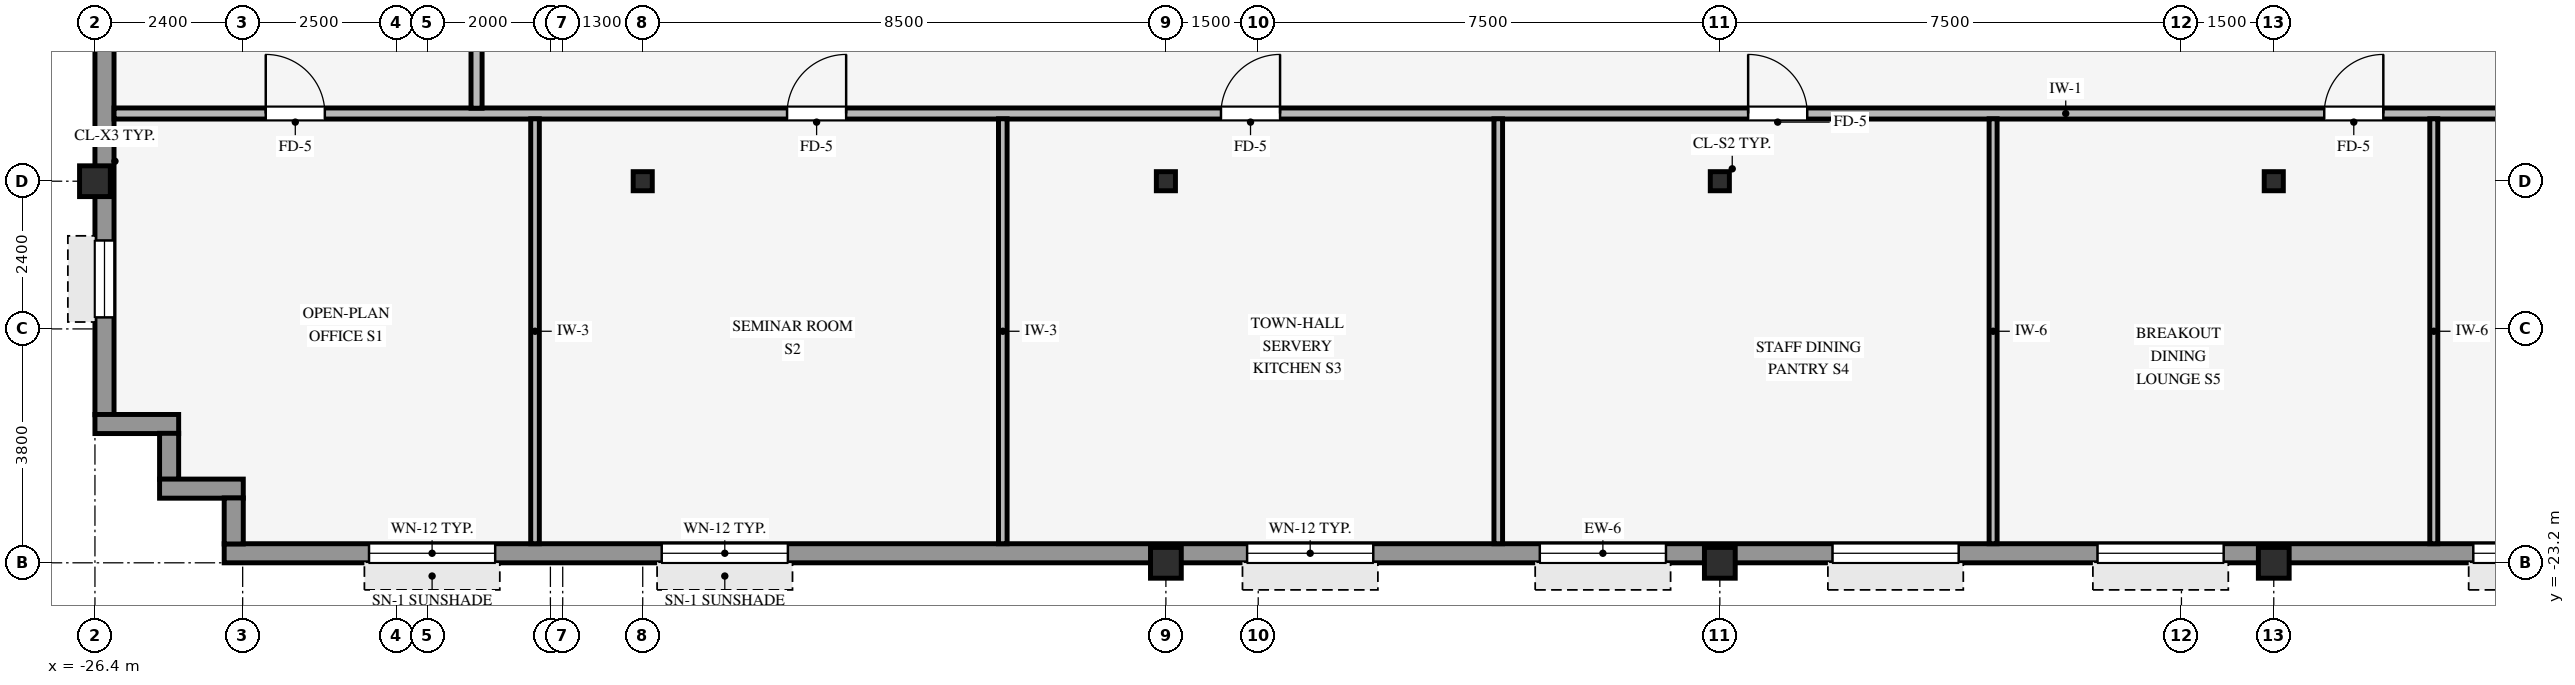
"""IFC4 building model, lengths in metres.
Left out: names, types, materials, properties, quantities, classifications, styles, units other than length and angle.
Written with IfcOpenShell. Run it as: python <this file> out.ifc"""

import sys

from ifc_helpers import new_model, si_unit, direction, frame, frame_2d, origin, origin_2d, place, context, subcontext, project, spatial, rectangle, hollow_rectangle, i_section, extrude, source, transform, mapped, element, fill, save


model = new_model("IFC4")
c1 = context("Model", 3, precision=1e-05, world=origin(), true_north=direction((0.0, 1.0)))
c2 = subcontext(c1, "Body", "Model", "MODEL_VIEW")
j1 = project(units=[si_unit("LENGTHUNIT", "METRE"), si_unit("PLANEANGLEUNIT", "RADIAN")], contexts=[c1])
p1 = place(None, origin())
s1 = spatial("IfcSite", under=j1, at=p1, CompositionType="ELEMENT")
p2 = place(p1, origin())
s2 = spatial("IfcBuilding", under=s1, at=p2, CompositionType="ELEMENT")
p3 = place(p2, frame((0.0, 0.0, 194.55)))
s3 = spatial("IfcBuildingStorey", under=s2, at=p3, CompositionType="ELEMENT", Elevation=194.55)
for number, where, z_axis, x_axis in (
    (1, (-26.4, -17.0, 0.0), (0.0, 0.0, 1.0), (1.0, 0.0, 0.0)),
    (2, (-9.0, -23.2, 0.0), (0.0, 0.0, 1.0), (1.0, 0.0, 0.0)),
    (3, (0.0, -23.2, 0.0), (0.0, 0.0, 1.0), (1.0, 0.0, 0.0)),
    (4, (9.0, -23.2, 0.0), (0.0, 0.0, 1.0), (1.0, 0.0, 0.0)),
):
    element("IfcColumn", number, at=place(p3, frame(where, z_axis=z_axis, x_axis=x_axis)), inside=s3, PredefinedType="COLUMN", context=c2, shape_type="SweptSolid", body=[
        extrude(hollow_rectangle(XDim=0.5, YDim=0.5, WallThickness=0.032, InnerFilletRadius=0.032, OuterFilletRadius=0.064, at=origin_2d()), origin(), (0.0, 0.0, 1.0), 3.37),
    ])
for number, where, z_axis, x_axis in (
    (5, (0.0, -17.0, 0.0), (0.0, 0.0, 1.0), (1.0, 0.0, 0.0)),
    (6, (-17.5, -17.0, 0.0), (0.0, 0.0, 1.0), (1.0, 0.0, 0.0)),
    (7, (-9.0, -17.0, 0.0), (0.0, 0.0, 1.0), (1.0, 0.0, 0.0)),
    (8, (9.0, -17.0, 0.0), (0.0, 0.0, 1.0), (1.0, 0.0, 0.0)),
):
    element("IfcColumn", number, at=place(p3, frame(where, z_axis=z_axis, x_axis=x_axis)), inside=s3, PredefinedType="COLUMN", context=c2, shape_type="SweptSolid", body=[
        extrude(i_section(OverallWidth=0.31, OverallDepth=0.31, WebThickness=0.015, FlangeThickness=0.015, FilletRadius=0.015, at=origin_2d()), origin(), (0.0, 0.0, 1.0), 3.37),
    ])
p4 = place(p3, frame((-24.3, -23.045, 0.0), z_axis=(0.0, 0.0, 1.0), x_axis=(1.0, 0.0, 0.0)))
e9 = element("IfcWall", 9, at=p4, inside=s3, PredefinedType="STANDARD", context=c2, shape_type="SweptSolid", body=[
    extrude(rectangle(XDim=44.8, YDim=0.31, at=frame_2d((22.4, 0.0))), origin(), (0.0, 0.0, 1.0), 2.705),
])
p5 = place(p4, frame((2.353, 0.0, 0.8)))
e10 = element("IfcOpeningElement", 10, at=p5, cuts=e9, PredefinedType="OPENING", context=c2, shape_type="SweptSolid", body=[
    extrude(rectangle(XDim=2.05, YDim=1.52, at=frame_2d((1.025, 0.76))), frame((0.0, 0.165, 0.0), z_axis=(0.0, -1.0, 0.0), x_axis=(1.0, 0.0, 0.0)), (0.0, 0.0, 1.0), 0.33),
])
p6 = place(p4, frame((7.108, 0.0, 0.8)))
e11 = element("IfcOpeningElement", 11, at=p6, cuts=e9, PredefinedType="OPENING", context=c2, shape_type="SweptSolid", body=[
    extrude(rectangle(XDim=2.05, YDim=1.52, at=frame_2d((1.025, 0.76))), frame((0.0, 0.165, 0.0), z_axis=(0.0, -1.0, 0.0), x_axis=(1.0, 0.0, 0.0)), (0.0, 0.0, 1.0), 0.33),
])
p7 = place(p4, frame((16.619, 0.0, 0.8)))
e12 = element("IfcOpeningElement", 12, at=p7, cuts=e9, PredefinedType="OPENING", context=c2, shape_type="SweptSolid", body=[
    extrude(rectangle(XDim=2.05, YDim=1.52, at=frame_2d((1.025, 0.76))), frame((0.0, 0.165, 0.0), z_axis=(0.0, -1.0, 0.0), x_axis=(1.0, 0.0, 0.0)), (0.0, 0.0, 1.0), 0.33),
])
p8 = place(p4, frame((21.375, 0.0, 0.8)))
e13 = element("IfcOpeningElement", 13, at=p8, cuts=e9, PredefinedType="OPENING", context=c2, shape_type="SweptSolid", body=[
    extrude(rectangle(XDim=2.05, YDim=1.52, at=frame_2d((1.025, 0.76))), frame((0.0, 0.165, 0.0), z_axis=(0.0, -1.0, 0.0), x_axis=(1.0, 0.0, 0.0)), (0.0, 0.0, 1.0), 0.33),
])
p9 = place(p4, frame((26.131, 0.0, 0.8)))
e14 = element("IfcOpeningElement", 14, at=p9, cuts=e9, PredefinedType="OPENING", context=c2, shape_type="SweptSolid", body=[
    extrude(rectangle(XDim=2.05, YDim=1.52, at=frame_2d((1.025, 0.76))), frame((0.0, 0.165, 0.0), z_axis=(0.0, -1.0, 0.0), x_axis=(1.0, 0.0, 0.0)), (0.0, 0.0, 1.0), 0.33),
])
p10 = place(p4, frame((30.436, 0.0, 0.8)))
e15 = element("IfcOpeningElement", 15, at=p10, cuts=e9, PredefinedType="OPENING", context=c2, shape_type="SweptSolid", body=[
    extrude(rectangle(XDim=2.05, YDim=1.52, at=frame_2d((1.025, 0.76))), frame((0.0, 0.165, 0.0), z_axis=(0.0, -1.0, 0.0), x_axis=(1.0, 0.0, 0.0)), (0.0, 0.0, 1.0), 0.33),
])
p11 = place(p4, frame((36.542, 0.0, 0.8)))
e16 = element("IfcOpeningElement", 16, at=p11, cuts=e9, PredefinedType="OPENING", context=c2, shape_type="SweptSolid", body=[
    extrude(rectangle(XDim=2.05, YDim=1.52, at=frame_2d((1.025, 0.76))), frame((0.0, 0.165, 0.0), z_axis=(0.0, -1.0, 0.0), x_axis=(1.0, 0.0, 0.0)), (0.0, 0.0, 1.0), 0.33),
])
p12 = place(p4, frame((40.397, 0.0, 0.8)))
e17 = element("IfcOpeningElement", 17, at=p12, cuts=e9, PredefinedType="OPENING", context=c2, shape_type="SweptSolid", body=[
    extrude(rectangle(XDim=2.05, YDim=1.52, at=frame_2d((1.025, 0.76))), frame((0.0, 0.165, 0.0), z_axis=(0.0, -1.0, 0.0), x_axis=(1.0, 0.0, 0.0)), (0.0, 0.0, 1.0), 0.33),
])
p13 = place(p3, frame((-26.245, -20.794, 0.0), z_axis=(0.0, 0.0, 1.0), x_axis=(0.0, 1.0, 0.0)))
e18 = element("IfcWall", 18, at=p13, inside=s3, PredefinedType="STANDARD", context=c2, shape_type="SweptSolid", body=[
    extrude(rectangle(XDim=37.788, YDim=0.31, at=frame_2d((18.894, 0.0))), origin(), (0.0, 0.0, 1.0), 2.705),
])
p14 = place(p13, frame((24.744, 0.0, 0.0)))
e19 = element("IfcOpeningElement", 19, at=p14, cuts=e18, PredefinedType="OPENING", context=c2, shape_type="SweptSolid", body=[
    extrude(rectangle(XDim=1.05, YDim=2.1, at=frame_2d((0.525, 1.05))), frame((0.0, 0.165, 0.0), z_axis=(0.0, -1.0, 0.0), x_axis=(1.0, 0.0, 0.0)), (0.0, 0.0, 1.0), 0.33),
])
p15 = place(p13, frame((1.581, 0.0, 0.8)))
e20 = element("IfcOpeningElement", 20, at=p15, cuts=e18, PredefinedType="OPENING", context=c2, shape_type="SweptSolid", body=[
    extrude(rectangle(XDim=1.25, YDim=1.52, at=frame_2d((0.625, 0.76))), frame((0.0, 0.165, 0.0), z_axis=(0.0, -1.0, 0.0), x_axis=(1.0, 0.0, 0.0)), (0.0, 0.0, 1.0), 0.33),
])
p16 = place(p13, frame((8.044, 0.0, 0.8)))
e21 = element("IfcOpeningElement", 21, at=p16, cuts=e18, PredefinedType="OPENING", context=c2, shape_type="SweptSolid", body=[
    extrude(rectangle(XDim=1.25, YDim=1.52, at=frame_2d((0.625, 0.76))), frame((0.0, 0.165, 0.0), z_axis=(0.0, -1.0, 0.0), x_axis=(1.0, 0.0, 0.0)), (0.0, 0.0, 1.0), 0.33),
])
p17 = place(p13, frame((13.156, 0.0, 0.8)))
e22 = element("IfcOpeningElement", 22, at=p17, cuts=e18, PredefinedType="OPENING", context=c2, shape_type="SweptSolid", body=[
    extrude(rectangle(XDim=1.25, YDim=1.52, at=frame_2d((0.625, 0.76))), frame((0.0, 0.165, 0.0), z_axis=(0.0, -1.0, 0.0), x_axis=(1.0, 0.0, 0.0)), (0.0, 0.0, 1.0), 0.33),
])
p18 = place(p13, frame((18.269, 0.0, 0.8)))
e23 = element("IfcOpeningElement", 23, at=p18, cuts=e18, PredefinedType="OPENING", context=c2, shape_type="SweptSolid", body=[
    extrude(rectangle(XDim=1.25, YDim=1.52, at=frame_2d((0.625, 0.76))), frame((0.0, 0.165, 0.0), z_axis=(0.0, -1.0, 0.0), x_axis=(1.0, 0.0, 0.0)), (0.0, 0.0, 1.0), 0.33),
])
p19 = place(p13, frame((22.932, 0.0, 0.8)))
e24 = element("IfcOpeningElement", 24, at=p19, cuts=e18, PredefinedType="OPENING", context=c2, shape_type="SweptSolid", body=[
    extrude(rectangle(XDim=1.25, YDim=1.52, at=frame_2d((0.625, 0.76))), frame((0.0, 0.165, 0.0), z_axis=(0.0, -1.0, 0.0), x_axis=(1.0, 0.0, 0.0)), (0.0, 0.0, 1.0), 0.33),
])
p20 = place(p13, frame((28.044, 0.0, 0.8)))
e25 = element("IfcOpeningElement", 25, at=p20, cuts=e18, PredefinedType="OPENING", context=c2, shape_type="SweptSolid", body=[
    extrude(rectangle(XDim=1.25, YDim=1.52, at=frame_2d((0.625, 0.76))), frame((0.0, 0.165, 0.0), z_axis=(0.0, -1.0, 0.0), x_axis=(1.0, 0.0, 0.0)), (0.0, 0.0, 1.0), 0.33),
])
p21 = place(p13, frame((33.607, 0.0, 0.8)))
e26 = element("IfcOpeningElement", 26, at=p21, cuts=e18, PredefinedType="OPENING", context=c2, shape_type="SweptSolid", body=[
    extrude(rectangle(XDim=1.25, YDim=1.52, at=frame_2d((0.625, 0.76))), frame((0.0, 0.165, 0.0), z_axis=(0.0, -1.0, 0.0), x_axis=(1.0, 0.0, 0.0)), (0.0, 0.0, 1.0), 0.33),
])
p22 = place(p3, frame((-26.4, -20.945, 0.0), z_axis=(0.0, 0.0, 1.0), x_axis=(1.0, 0.0, 0.0)))
e27 = element("IfcWall", 27, at=p22, inside=s3, PredefinedType="STANDARD", context=c2, shape_type="SweptSolid", body=[
    extrude(rectangle(XDim=1.36, YDim=0.31, at=frame_2d((0.68, 0.0))), origin(), (0.0, 0.0, 1.0), 3.36),
])
p23 = place(p3, frame((-25.195, -21.844, 0.0), z_axis=(0.0, 0.0, 1.0), x_axis=(0.0, 1.0, 0.0)))
e28 = element("IfcWall", 28, at=p23, inside=s3, PredefinedType="STANDARD", context=c2, shape_type="SweptSolid", body=[
    extrude(rectangle(XDim=0.748, YDim=0.31, at=frame_2d((0.374, 0.0))), origin(), (0.0, 0.0, 1.0), 3.36),
])
p24 = place(p3, frame((-25.35, -21.995, 0.0), z_axis=(0.0, 0.0, 1.0), x_axis=(1.0, 0.0, 0.0)))
e29 = element("IfcWall", 29, at=p24, inside=s3, PredefinedType="STANDARD", context=c2, shape_type="SweptSolid", body=[
    extrude(rectangle(XDim=1.36, YDim=0.31, at=frame_2d((0.68, 0.0))), origin(), (0.0, 0.0, 1.0), 3.36),
])
p25 = place(p3, frame((-24.145, -22.894, 0.0), z_axis=(0.0, 0.0, 1.0), x_axis=(0.0, 1.0, 0.0)))
e30 = element("IfcWall", 30, at=p25, inside=s3, PredefinedType="STANDARD", context=c2, shape_type="SweptSolid", body=[
    extrude(rectangle(XDim=0.748, YDim=0.31, at=frame_2d((0.374, 0.0))), origin(), (0.0, 0.0, 1.0), 3.36),
])
p26 = place(p3, frame((-26.09, -15.9, 0.0), z_axis=(0.0, 0.0, 1.0), x_axis=(1.0, 0.0, 0.0)))
e31 = element("IfcWall", 31, at=p26, inside=s3, PredefinedType="PARTITIONING", context=c2, shape_type="SweptSolid", body=[
    extrude(rectangle(XDim=48.38, YDim=0.18, at=frame_2d((24.19, 0.0))), origin(), (0.0, 0.0, 1.0), 3.36),
])
p27 = place(p26, frame((41.81, 0.0, 0.0)))
e32 = element("IfcOpeningElement", 32, at=p27, cuts=e31, PredefinedType="OPENING", context=c2, shape_type="SweptSolid", body=[
    extrude(rectangle(XDim=0.96, YDim=2.1, at=frame_2d((0.48, 1.05))), frame((0.0, 0.1, 0.0), z_axis=(0.0, -1.0, 0.0), x_axis=(1.0, 0.0, 0.0)), (0.0, 0.0, 1.0), 0.2),
])
p28 = place(p26, frame((17.985, 0.0, 0.0)))
e33 = element("IfcOpeningElement", 33, at=p28, cuts=e31, PredefinedType="OPENING", context=c2, shape_type="SweptSolid", body=[
    extrude(rectangle(XDim=0.96, YDim=2.1, at=frame_2d((0.48, 1.05))), frame((0.0, 0.1, 0.0), z_axis=(0.0, -1.0, 0.0), x_axis=(1.0, 0.0, 0.0)), (0.0, 0.0, 1.0), 0.2),
])
p29 = place(p26, frame((26.55, 0.0, 0.0)))
e34 = element("IfcOpeningElement", 34, at=p29, cuts=e31, PredefinedType="OPENING", context=c2, shape_type="SweptSolid", body=[
    extrude(rectangle(XDim=0.96, YDim=2.1, at=frame_2d((0.48, 1.05))), frame((0.0, 0.1, 0.0), z_axis=(0.0, -1.0, 0.0), x_axis=(1.0, 0.0, 0.0)), (0.0, 0.0, 1.0), 0.2),
])
p30 = place(p26, frame((10.935, 0.0, 0.0)))
e35 = element("IfcOpeningElement", 35, at=p30, cuts=e31, PredefinedType="OPENING", context=c2, shape_type="SweptSolid", body=[
    extrude(rectangle(XDim=0.96, YDim=2.1, at=frame_2d((0.48, 1.05))), frame((0.0, 0.1, 0.0), z_axis=(0.0, -1.0, 0.0), x_axis=(1.0, 0.0, 0.0)), (0.0, 0.0, 1.0), 0.2),
])
p31 = place(p26, frame((35.91, 0.0, 0.0)))
e36 = element("IfcOpeningElement", 36, at=p31, cuts=e31, PredefinedType="OPENING", context=c2, shape_type="SweptSolid", body=[
    extrude(rectangle(XDim=0.96, YDim=2.1, at=frame_2d((0.48, 1.05))), frame((0.0, 0.1, 0.0), z_axis=(0.0, -1.0, 0.0), x_axis=(1.0, 0.0, 0.0)), (0.0, 0.0, 1.0), 0.2),
])
p32 = place(p26, frame((2.465, 0.0, 0.0)))
e37 = element("IfcOpeningElement", 37, at=p32, cuts=e31, PredefinedType="OPENING", context=c2, shape_type="SweptSolid", body=[
    extrude(rectangle(XDim=0.96, YDim=2.1, at=frame_2d((0.48, 1.05))), frame((0.0, 0.1, 0.0), z_axis=(0.0, -1.0, 0.0), x_axis=(1.0, 0.0, 0.0)), (0.0, 0.0, 1.0), 0.2),
])
p33 = place(p3, frame((-20.2, -15.814, 0.0), z_axis=(0.0, 0.0, 1.0), x_axis=(0.0, 1.0, 0.0)))
e38 = element("IfcWall", 38, at=p33, inside=s3, PredefinedType="PARTITIONING", context=c2, shape_type="SweptSolid", body=[
    extrude(rectangle(XDim=31.628, YDim=0.18, at=frame_2d((15.814, 0.0))), origin(), (0.0, 0.0, 1.0), 3.36),
])
p34 = place(p33, frame((15.334, 0.0, 0.0)))
e39 = element("IfcOpeningElement", 39, at=p34, cuts=e38, PredefinedType="OPENING", context=c2, shape_type="SweptSolid", body=[
    extrude(rectangle(XDim=0.96, YDim=2.1, at=frame_2d((0.48, 1.05))), frame((0.0, 0.1, 0.0), z_axis=(0.0, -1.0, 0.0), x_axis=(1.0, 0.0, 0.0)), (0.0, 0.0, 1.0), 0.2),
])
p35 = place(p33, frame((5.834, 0.0, 0.0)))
e40 = element("IfcOpeningElement", 40, at=p35, cuts=e38, PredefinedType="OPENING", context=c2, shape_type="SweptSolid", body=[
    extrude(rectangle(XDim=0.96, YDim=2.1, at=frame_2d((0.48, 1.05))), frame((0.0, 0.1, 0.0), z_axis=(0.0, -1.0, 0.0), x_axis=(1.0, 0.0, 0.0)), (0.0, 0.0, 1.0), 0.2),
])
p36 = place(p33, frame((24.834, 0.0, 0.0)))
e41 = element("IfcOpeningElement", 41, at=p36, cuts=e38, PredefinedType="OPENING", context=c2, shape_type="SweptSolid", body=[
    extrude(rectangle(XDim=0.96, YDim=2.1, at=frame_2d((0.48, 1.05))), frame((0.0, 0.1, 0.0), z_axis=(0.0, -1.0, 0.0), x_axis=(1.0, 0.0, 0.0)), (0.0, 0.0, 1.0), 0.2),
])
for number, where, z_axis, x_axis in (
    (42, (-19.25, -22.89, 0.0), (0.0, 0.0, 1.0), (0.0, 1.0, 0.0)),
    (43, (-11.65, -22.89, 0.0), (0.0, 0.0, 1.0), (0.0, 1.0, 0.0)),
    (44, (-3.6, -22.89, 0.0), (0.0, 0.0, 1.0), (0.0, 1.0, 0.0)),
):
    element("IfcWall", number, at=place(p3, frame(where, z_axis=z_axis, x_axis=x_axis)), inside=s3, PredefinedType="PARTITIONING", context=c2, shape_type="SweptSolid", body=[
        extrude(rectangle(XDim=6.904, YDim=0.14, at=frame_2d((3.452, 0.0))), origin(), (0.0, 0.0, 1.0), 3.36),
    ])
for number, where, z_axis, x_axis in (
    (45, (4.44, -22.89, 0.0), (0.0, 0.0, 1.0), (0.0, 1.0, 0.0)),
    (46, (11.6, -22.89, 0.0), (0.0, 0.0, 1.0), (0.0, 1.0, 0.0)),
):
    element("IfcWall", number, at=place(p3, frame(where, z_axis=z_axis, x_axis=x_axis)), inside=s3, PredefinedType="PARTITIONING", context=c2, shape_type="SweptSolid", body=[
        extrude(rectangle(XDim=6.904, YDim=0.13, at=frame_2d((3.452, 0.0))), origin(), (0.0, 0.0, 1.0), 3.36),
    ])
m1 = source(origin(), c2, "Body", "SweptSolid", [
    extrude(rectangle(XDim=2.05, YDim=1.52, at=frame_2d((1.025, 0.76))), frame((0.0, 0.03, 0.0), z_axis=(0.0, -1.0, 0.0), x_axis=(1.0, 0.0, 0.0)), (0.0, 0.0, 1.0), 0.06),
])
p37 = place(p5, origin())
e47 = element("IfcWindow", 47, at=p37, inside=s3, PartitioningType="SINGLE_PANEL", PredefinedType="WINDOW", context=c2, shape_type="MappedRepresentation", body=[
    mapped(m1, transform((0.0, 0.0, 0.0), scale=1.0)),
])
fill(e10, e47)
p38 = place(p6, origin())
e48 = element("IfcWindow", 48, at=p38, inside=s3, PartitioningType="SINGLE_PANEL", PredefinedType="WINDOW", context=c2, shape_type="MappedRepresentation", body=[
    mapped(m1, transform((0.0, 0.0, 0.0), scale=1.0)),
])
fill(e11, e48)
p39 = place(p7, origin())
e49 = element("IfcWindow", 49, at=p39, inside=s3, PartitioningType="SINGLE_PANEL", PredefinedType="WINDOW", context=c2, shape_type="MappedRepresentation", body=[
    mapped(m1, transform((0.0, 0.0, 0.0), scale=1.0)),
])
fill(e12, e49)
p40 = place(p8, origin())
e50 = element("IfcWindow", 50, at=p40, inside=s3, PartitioningType="SINGLE_PANEL", PredefinedType="WINDOW", context=c2, shape_type="MappedRepresentation", body=[
    mapped(m1, transform((0.0, 0.0, 0.0), scale=1.0)),
])
fill(e13, e50)
p41 = place(p9, origin())
e51 = element("IfcWindow", 51, at=p41, inside=s3, PartitioningType="SINGLE_PANEL", PredefinedType="WINDOW", context=c2, shape_type="MappedRepresentation", body=[
    mapped(m1, transform((0.0, 0.0, 0.0), scale=1.0)),
])
fill(e14, e51)
p42 = place(p10, origin())
e52 = element("IfcWindow", 52, at=p42, inside=s3, PartitioningType="SINGLE_PANEL", PredefinedType="WINDOW", context=c2, shape_type="MappedRepresentation", body=[
    mapped(m1, transform((0.0, 0.0, 0.0), scale=1.0)),
])
fill(e15, e52)
p43 = place(p11, origin())
e53 = element("IfcWindow", 53, at=p43, inside=s3, PartitioningType="SINGLE_PANEL", PredefinedType="WINDOW", context=c2, shape_type="MappedRepresentation", body=[
    mapped(m1, transform((0.0, 0.0, 0.0), scale=1.0)),
])
fill(e16, e53)
m2 = source(origin(), c2, "Body", "SweptSolid", [
    extrude(rectangle(XDim=1.25, YDim=1.52, at=frame_2d((0.625, 0.76))), frame((0.0, 0.03, 0.0), z_axis=(0.0, -1.0, 0.0), x_axis=(1.0, 0.0, 0.0)), (0.0, 0.0, 1.0), 0.06),
])
p44 = place(p15, origin())
e54 = element("IfcWindow", 54, at=p44, inside=s3, PartitioningType="SINGLE_PANEL", PredefinedType="WINDOW", context=c2, shape_type="MappedRepresentation", body=[
    mapped(m2, transform((0.0, 0.0, 0.0), scale=1.0)),
])
fill(e20, e54)
m3 = source(origin(), c2, "Body", "SweptSolid", [
    extrude(rectangle(XDim=0.96, YDim=2.1, at=frame_2d((0.48, 1.05))), frame((0.0, 0.025, 0.0), z_axis=(0.0, -1.0, 0.0), x_axis=(1.0, 0.0, 0.0)), (0.0, 0.0, 1.0), 0.05),
])
p45 = place(p28, origin())
e55 = element("IfcDoor", 55, at=p45, inside=s3, OperationType="SINGLE_SWING_RIGHT", PredefinedType="DOOR", context=c2, shape_type="MappedRepresentation", body=[
    mapped(m3, transform((0.0, 0.0, 0.0), scale=1.0)),
])
fill(e33, e55)
p46 = place(p29, origin())
e56 = element("IfcDoor", 56, at=p46, inside=s3, OperationType="SINGLE_SWING_LEFT", PredefinedType="DOOR", context=c2, shape_type="MappedRepresentation", body=[
    mapped(m3, transform((0.0, 0.0, 0.0), scale=1.0)),
])
fill(e34, e56)
p47 = place(p30, origin())
e57 = element("IfcDoor", 57, at=p47, inside=s3, OperationType="SINGLE_SWING_RIGHT", PredefinedType="DOOR", context=c2, shape_type="MappedRepresentation", body=[
    mapped(m3, transform((0.0, 0.0, 0.0), scale=1.0)),
])
fill(e35, e57)
p48 = place(p31, origin())
e58 = element("IfcDoor", 58, at=p48, inside=s3, OperationType="SINGLE_SWING_RIGHT", PredefinedType="DOOR", context=c2, shape_type="MappedRepresentation", body=[
    mapped(m3, transform((0.0, 0.0, 0.0), scale=1.0)),
])
fill(e36, e58)
p49 = place(p32, origin())
e59 = element("IfcDoor", 59, at=p49, inside=s3, OperationType="SINGLE_SWING_LEFT", PredefinedType="DOOR", context=c2, shape_type="MappedRepresentation", body=[
    mapped(m3, transform((0.0, 0.0, 0.0), scale=1.0)),
])
fill(e37, e59)
save(model, sys.argv[1])
